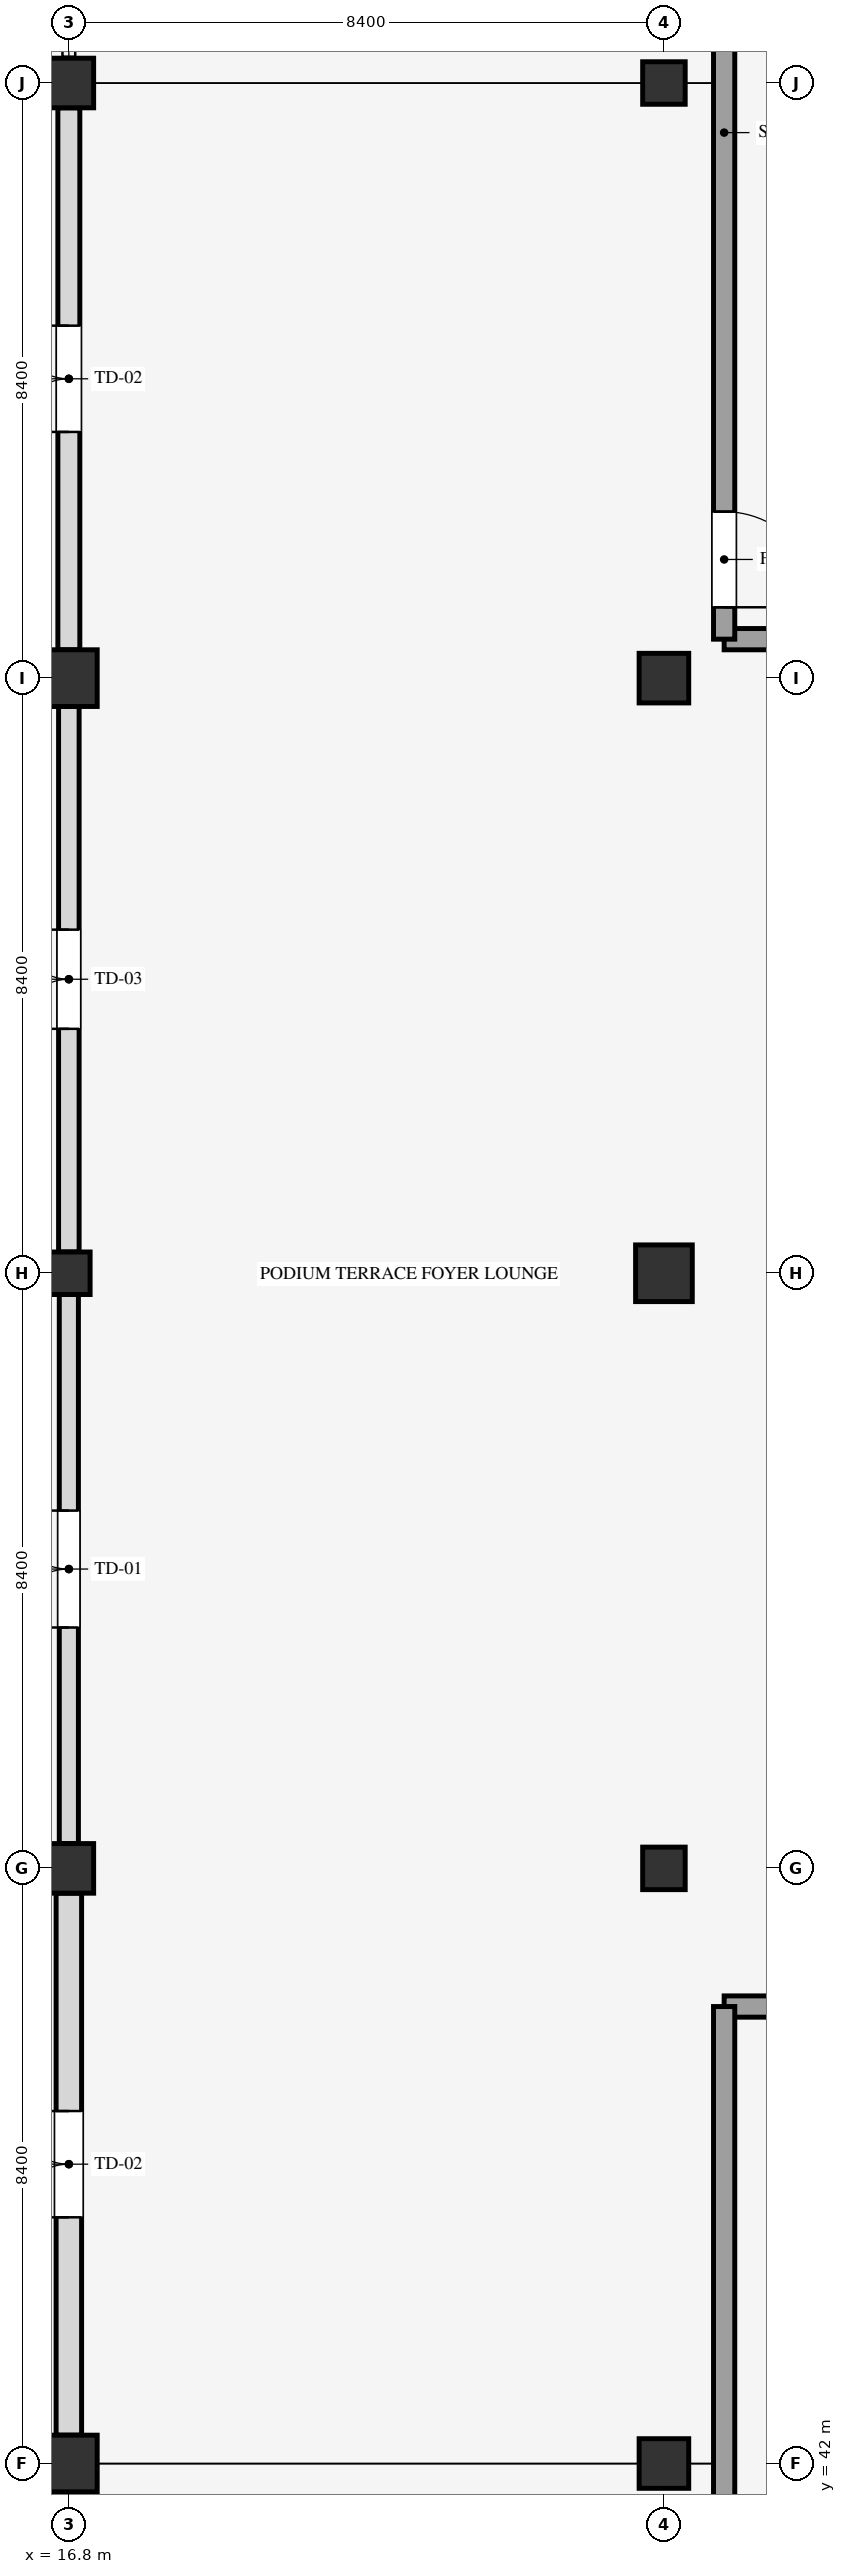
"""IFC4 building model, lengths in metres.
Left out: names, types, materials, properties, quantities, classifications, styles, units other than length and angle.
Written with IfcOpenShell. Run it as: python <this file> out.ifc"""

import sys

from ifc_helpers import new_model, si_unit, direction, frame, frame_2d, origin, origin_2d, place, context, subcontext, project, spatial, rectangle, extrude, element, fill, save


model = new_model("IFC4")
c1 = context("Model", 3, precision=1e-05, world=origin(), true_north=direction((0.0, 1.0)))
c2 = subcontext(c1, "Body", "Model", "MODEL_VIEW")
j1 = project(units=[si_unit("LENGTHUNIT", "METRE"), si_unit("PLANEANGLEUNIT", "RADIAN")], contexts=[c1])
p1 = place(None, origin())
s1 = spatial("IfcSite", under=j1, at=p1, CompositionType="ELEMENT")
p2 = place(p1, origin())
s2 = spatial("IfcBuilding", under=s1, at=p2, CompositionType="ELEMENT")
p3 = place(p2, frame((0.0, 0.0, 18.9)))
s3 = spatial("IfcBuildingStorey", under=s2, at=p3, CompositionType="ELEMENT", Elevation=18.9)
p4 = place(p3, frame((16.8, 42.0, 0.0), z_axis=(0.0, 0.0, 1.0), x_axis=(1.0, 0.0, 0.0)))
e1 = element("IfcColumn", 1, at=p4, inside=s3, PredefinedType="COLUMN", context=c2, shape_type="SweptSolid", body=[
    extrude(rectangle(XDim=0.8, YDim=0.8, at=origin_2d()), origin(), (0.0, 0.0, 1.0), 4.5),
])
p5 = place(p3, frame((16.8, 50.4, 0.0), z_axis=(0.0, 0.0, 1.0), x_axis=(1.0, 0.0, 0.0)))
e2 = element("IfcColumn", 2, at=p5, inside=s3, PredefinedType="COLUMN", context=c2, shape_type="SweptSolid", body=[
    extrude(rectangle(XDim=0.7, YDim=0.7, at=origin_2d()), origin(), (0.0, 0.0, 1.0), 4.5),
])
p6 = place(p3, frame((16.8, 58.8, 0.0), z_axis=(0.0, 0.0, 1.0), x_axis=(1.0, 0.0, 0.0)))
e3 = element("IfcColumn", 3, at=p6, inside=s3, PredefinedType="COLUMN", context=c2, shape_type="SweptSolid", body=[
    extrude(rectangle(XDim=0.6, YDim=0.6, at=origin_2d()), origin(), (0.0, 0.0, 1.0), 4.5),
])
p7 = place(p3, frame((16.8, 67.2, 0.0), z_axis=(0.0, 0.0, 1.0), x_axis=(1.0, 0.0, 0.0)))
e4 = element("IfcColumn", 4, at=p7, inside=s3, PredefinedType="COLUMN", context=c2, shape_type="SweptSolid", body=[
    extrude(rectangle(XDim=0.8, YDim=0.8, at=origin_2d()), origin(), (0.0, 0.0, 1.0), 4.5),
])
for number, where, z_axis, x_axis in (
    (5, (16.8, 75.6, 0.0), (0.0, 0.0, 1.0), (1.0, 0.0, 0.0)),
    (6, (25.2, 42.0, 0.0), (0.0, 0.0, 1.0), (1.0, 0.0, 0.0)),
):
    element("IfcColumn", number, at=place(p3, frame(where, z_axis=z_axis, x_axis=x_axis)), inside=s3, PredefinedType="COLUMN", context=c2, shape_type="SweptSolid", body=[
        extrude(rectangle(XDim=0.7, YDim=0.7, at=origin_2d()), origin(), (0.0, 0.0, 1.0), 4.5),
    ])
p8 = place(p3, frame((25.2, 50.4, 0.0), z_axis=(0.0, 0.0, 1.0), x_axis=(1.0, 0.0, 0.0)))
e7 = element("IfcColumn", 7, at=p8, inside=s3, PredefinedType="COLUMN", context=c2, shape_type="SweptSolid", body=[
    extrude(rectangle(XDim=0.6, YDim=0.6, at=origin_2d()), origin(), (0.0, 0.0, 1.0), 4.5),
])
p9 = place(p3, frame((25.2, 58.8, 0.0), z_axis=(0.0, 0.0, 1.0), x_axis=(1.0, 0.0, 0.0)))
e8 = element("IfcColumn", 8, at=p9, inside=s3, PredefinedType="COLUMN", context=c2, shape_type="SweptSolid", body=[
    extrude(rectangle(XDim=0.8, YDim=0.8, at=origin_2d()), origin(), (0.0, 0.0, 1.0), 4.5),
])
p10 = place(p3, frame((25.2, 67.2, 0.0), z_axis=(0.0, 0.0, 1.0), x_axis=(1.0, 0.0, 0.0)))
e9 = element("IfcColumn", 9, at=p10, inside=s3, PredefinedType="COLUMN", context=c2, shape_type="SweptSolid", body=[
    extrude(rectangle(XDim=0.7, YDim=0.7, at=origin_2d()), origin(), (0.0, 0.0, 1.0), 4.5),
])
p11 = place(p3, frame((25.2, 75.6, 0.0), z_axis=(0.0, 0.0, 1.0), x_axis=(1.0, 0.0, 0.0)))
e10 = element("IfcColumn", 10, at=p11, inside=s3, PredefinedType="COLUMN", context=c2, shape_type="SweptSolid", body=[
    extrude(rectangle(XDim=0.6, YDim=0.6, at=origin_2d()), origin(), (0.0, 0.0, 1.0), 4.5),
])
p12 = place(p3, frame((16.8, 75.25, 0.0), z_axis=(0.0, 0.0, 1.0), x_axis=(0.0, -1.0, 0.0)))
e11 = element("IfcWall", 11, at=p12, inside=s3, PredefinedType="STANDARD", context=c2, shape_type="SweptSolid", body=[
    extrude(rectangle(XDim=7.65, YDim=0.31, at=frame_2d((3.825, 0.0))), origin(), (0.0, 0.0, 1.0), 3.68),
])
p13 = place(p12, frame((3.075, 0.0, 0.0)))
e12 = element("IfcOpeningElement", 12, at=p13, cuts=e11, PredefinedType="OPENING", context=c2, shape_type="SweptSolid", body=[
    extrude(rectangle(XDim=1.5, YDim=2.2, at=frame_2d((0.75, 1.1))), frame((0.0, 0.165, 0.0), z_axis=(0.0, -1.0, 0.0), x_axis=(1.0, 0.0, 0.0)), (0.0, 0.0, 1.0), 0.33),
])
p14 = place(p3, frame((16.8, 66.8, 0.0), z_axis=(0.0, 0.0, 1.0), x_axis=(0.0, -1.0, 0.0)))
e13 = element("IfcWall", 13, at=p14, inside=s3, PredefinedType="STANDARD", context=c2, shape_type="SweptSolid", body=[
    extrude(rectangle(XDim=7.7, YDim=0.29, at=frame_2d((3.85, 0.0))), origin(), (0.0, 0.0, 1.0), 3.68),
])
p15 = place(p14, frame((3.15, 0.0, 0.0)))
e14 = element("IfcOpeningElement", 14, at=p15, cuts=e13, PredefinedType="OPENING", context=c2, shape_type="SweptSolid", body=[
    extrude(rectangle(XDim=1.4, YDim=2.15, at=frame_2d((0.7, 1.075))), frame((0.0, 0.155, 0.0), z_axis=(0.0, -1.0, 0.0), x_axis=(1.0, 0.0, 0.0)), (0.0, 0.0, 1.0), 0.31),
])
p16 = place(p3, frame((16.8, 58.5, 0.0), z_axis=(0.0, 0.0, 1.0), x_axis=(0.0, -1.0, 0.0)))
e15 = element("IfcWall", 15, at=p16, inside=s3, PredefinedType="STANDARD", context=c2, shape_type="SweptSolid", body=[
    extrude(rectangle(XDim=7.75, YDim=0.27, at=frame_2d((3.875, 0.0))), origin(), (0.0, 0.0, 1.0), 3.68),
])
p17 = place(p16, frame((3.05, 0.0, 0.0)))
e16 = element("IfcOpeningElement", 16, at=p17, cuts=e15, PredefinedType="OPENING", context=c2, shape_type="SweptSolid", body=[
    extrude(rectangle(XDim=1.65, YDim=2.2, at=frame_2d((0.825, 1.1))), frame((0.0, 0.145, 0.0), z_axis=(0.0, -1.0, 0.0), x_axis=(1.0, 0.0, 0.0)), (0.0, 0.0, 1.0), 0.29),
])
p18 = place(p3, frame((16.8, 50.05, 0.0), z_axis=(0.0, 0.0, 1.0), x_axis=(0.0, -1.0, 0.0)))
e17 = element("IfcWall", 17, at=p18, inside=s3, PredefinedType="STANDARD", context=c2, shape_type="SweptSolid", body=[
    extrude(rectangle(XDim=7.65, YDim=0.36, at=frame_2d((3.825, 0.0))), origin(), (0.0, 0.0, 1.0), 3.68),
])
p19 = place(p18, frame((3.075, 0.0, 0.0)))
e18 = element("IfcOpeningElement", 18, at=p19, cuts=e17, PredefinedType="OPENING", context=c2, shape_type="SweptSolid", body=[
    extrude(rectangle(XDim=1.5, YDim=2.2, at=frame_2d((0.75, 1.1))), frame((0.0, 0.19, 0.0), z_axis=(0.0, -1.0, 0.0), x_axis=(1.0, 0.0, 0.0)), (0.0, 0.0, 1.0), 0.38),
])
p20 = place(p3, frame((16.8, 41.6, 0.0), z_axis=(0.0, 0.0, 1.0), x_axis=(0.0, -1.0, 0.0)))
e19 = element("IfcWall", 19, at=p20, inside=s3, PredefinedType="STANDARD", context=c2, shape_type="SweptSolid", body=[
    extrude(rectangle(XDim=7.7, YDim=0.34, at=frame_2d((3.85, 0.0))), origin(), (0.0, 0.0, 1.0), 3.68),
])
p21 = place(p20, frame((2.85, 0.0, 0.85)))
e20 = element("IfcOpeningElement", 20, at=p21, cuts=e19, PredefinedType="OPENING", context=c2, shape_type="SweptSolid", body=[
    extrude(rectangle(XDim=2.0, YDim=2.2, at=frame_2d((1.0, 1.1))), frame((0.0, 0.18, 0.0), z_axis=(0.0, -1.0, 0.0), x_axis=(1.0, 0.0, 0.0)), (0.0, 0.0, 1.0), 0.36),
])
p22 = place(p3, frame((26.05, 48.45, 0.0), z_axis=(0.0, 0.0, 1.0), x_axis=(1.0, 0.0, 0.0)))
e21 = element("IfcWall", 21, at=p22, inside=s3, PredefinedType="SHEAR", context=c2, shape_type="SweptSolid", body=[
    extrude(rectangle(XDim=4.5, YDim=0.3, at=frame_2d((2.25, 0.0))), origin(), (0.0, 0.0, 1.0), 4.5),
])
p23 = place(p3, frame((26.05, 34.15, 0.0), z_axis=(0.0, 0.0, 1.0), x_axis=(0.0, 1.0, 0.0)))
e22 = element("IfcWall", 22, at=p23, inside=s3, PredefinedType="SHEAR", context=c2, shape_type="SweptSolid", body=[
    extrude(rectangle(XDim=14.3, YDim=0.3, at=frame_2d((7.15, 0.0))), origin(), (0.0, 0.0, 1.0), 4.5),
])
p24 = place(p23, frame((0.45, 0.0, 0.0)))
e23 = element("IfcOpeningElement", 23, at=p24, cuts=e22, PredefinedType="OPENING", context=c2, shape_type="SweptSolid", body=[
    extrude(rectangle(XDim=1.35, YDim=2.15, at=frame_2d((0.675, 1.075))), frame((0.0, 0.16, 0.0), z_axis=(0.0, -1.0, 0.0), x_axis=(1.0, 0.0, 0.0)), (0.0, 0.0, 1.0), 0.32),
])
p25 = place(p3, frame((26.05, 67.75, 0.0), z_axis=(0.0, 0.0, 1.0), x_axis=(1.0, 0.0, 0.0)))
e24 = element("IfcWall", 24, at=p25, inside=s3, PredefinedType="SHEAR", context=c2, shape_type="SweptSolid", body=[
    extrude(rectangle(XDim=4.5, YDim=0.3, at=frame_2d((2.25, 0.0))), origin(), (0.0, 0.0, 1.0), 4.5),
])
p26 = place(p3, frame((26.05, 67.75, 0.0), z_axis=(0.0, 0.0, 1.0), x_axis=(0.0, 1.0, 0.0)))
e25 = element("IfcWall", 25, at=p26, inside=s3, PredefinedType="SHEAR", context=c2, shape_type="SweptSolid", body=[
    extrude(rectangle(XDim=14.3, YDim=0.3, at=frame_2d((7.15, 0.0))), origin(), (0.0, 0.0, 1.0), 4.5),
])
p27 = place(p26, frame((0.45, 0.0, 0.0)))
e26 = element("IfcOpeningElement", 26, at=p27, cuts=e25, PredefinedType="OPENING", context=c2, shape_type="SweptSolid", body=[
    extrude(rectangle(XDim=1.35, YDim=2.15, at=frame_2d((0.675, 1.075))), frame((0.0, 0.16, 0.0), z_axis=(0.0, -1.0, 0.0), x_axis=(1.0, 0.0, 0.0)), (0.0, 0.0, 1.0), 0.32),
])
p28 = place(p13, frame((1.5, 0.0, 0.0), z_axis=(0.0, 0.0, 1.0), x_axis=(-1.0, 0.0, 0.0)))
e27 = element("IfcDoor", 27, at=p28, inside=s3, OperationType="DOUBLE_DOOR_SINGLE_SWING", PredefinedType="DOOR", context=c2, shape_type="SweptSolid", body=[
    extrude(rectangle(XDim=1.5, YDim=2.2, at=frame_2d((0.75, 1.1))), frame((0.0, 0.025, 0.0), z_axis=(0.0, -1.0, 0.0), x_axis=(1.0, 0.0, 0.0)), (0.0, 0.0, 1.0), 0.05),
])
fill(e12, e27)
p29 = place(p15, frame((1.4, 0.0, 0.0), z_axis=(0.0, 0.0, 1.0), x_axis=(-1.0, 0.0, 0.0)))
e28 = element("IfcDoor", 28, at=p29, inside=s3, OperationType="DOUBLE_DOOR_SINGLE_SWING", PredefinedType="DOOR", context=c2, shape_type="SweptSolid", body=[
    extrude(rectangle(XDim=1.4, YDim=2.15, at=frame_2d((0.7, 1.075))), frame((0.0, 0.025, 0.0), z_axis=(0.0, -1.0, 0.0), x_axis=(1.0, 0.0, 0.0)), (0.0, 0.0, 1.0), 0.05),
])
fill(e14, e28)
p30 = place(p17, frame((1.65, 0.0, 0.0), z_axis=(0.0, 0.0, 1.0), x_axis=(-1.0, 0.0, 0.0)))
e29 = element("IfcDoor", 29, at=p30, inside=s3, OperationType="DOUBLE_DOOR_SINGLE_SWING", PredefinedType="DOOR", context=c2, shape_type="SweptSolid", body=[
    extrude(rectangle(XDim=1.65, YDim=2.2, at=frame_2d((0.825, 1.1))), frame((0.0, 0.025, 0.0), z_axis=(0.0, -1.0, 0.0), x_axis=(1.0, 0.0, 0.0)), (0.0, 0.0, 1.0), 0.05),
])
fill(e16, e29)
p31 = place(p19, frame((1.5, 0.0, 0.0), z_axis=(0.0, 0.0, 1.0), x_axis=(-1.0, 0.0, 0.0)))
e30 = element("IfcDoor", 30, at=p31, inside=s3, OperationType="DOUBLE_DOOR_SINGLE_SWING", PredefinedType="DOOR", context=c2, shape_type="SweptSolid", body=[
    extrude(rectangle(XDim=1.5, YDim=2.2, at=frame_2d((0.75, 1.1))), frame((0.0, 0.025, 0.0), z_axis=(0.0, -1.0, 0.0), x_axis=(1.0, 0.0, 0.0)), (0.0, 0.0, 1.0), 0.05),
])
fill(e18, e30)
p32 = place(p27, frame((1.35, 0.0, 0.0), z_axis=(0.0, 0.0, 1.0), x_axis=(-1.0, 0.0, 0.0)))
e31 = element("IfcDoor", 31, at=p32, inside=s3, OperationType="SINGLE_SWING_RIGHT", PredefinedType="DOOR", context=c2, shape_type="SweptSolid", body=[
    extrude(rectangle(XDim=1.35, YDim=2.15, at=frame_2d((0.675, 1.075))), frame((0.0, 0.025, 0.0), z_axis=(0.0, -1.0, 0.0), x_axis=(1.0, 0.0, 0.0)), (0.0, 0.0, 1.0), 0.05),
])
fill(e26, e31)
save(model, sys.argv[1])
